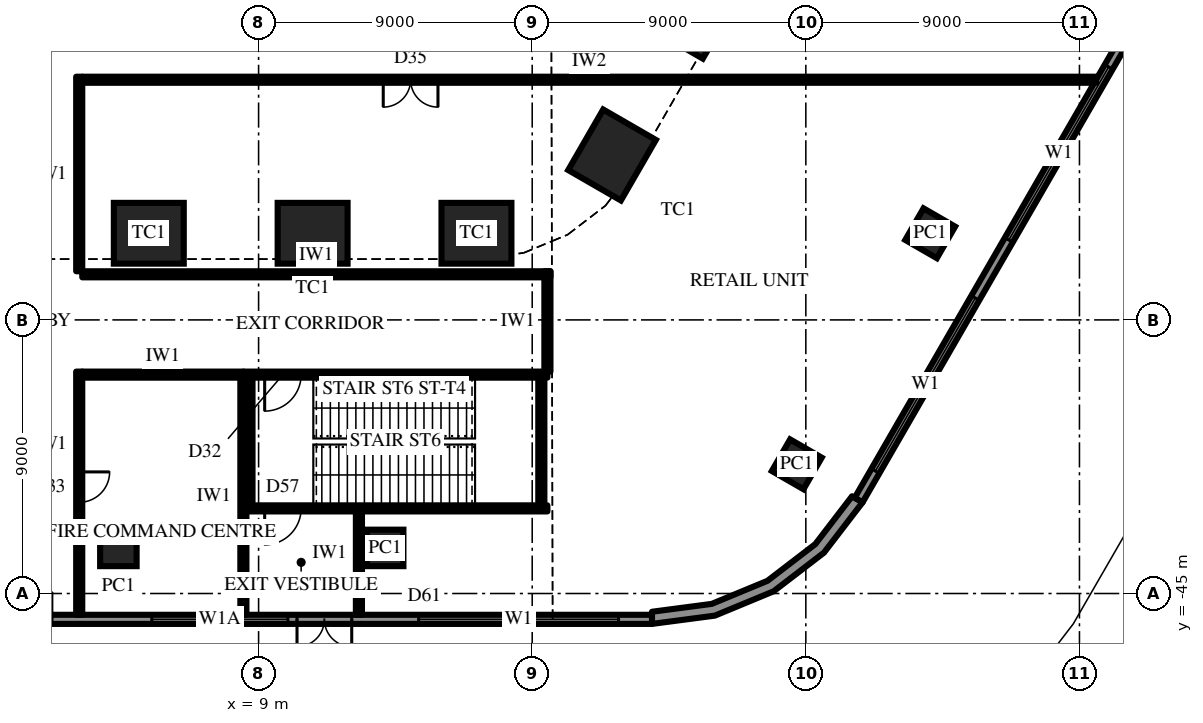
"""IFC4 building model, lengths in metres.
Left out: names, types, materials, properties, quantities, classifications, styles, units other than length and angle.
Written with IfcOpenShell. Run it as: python <this file> out.ifc"""

import sys

from ifc_helpers import new_model, si_unit, direction, frame, frame_2d, origin, origin_2d, place, context, subcontext, project, spatial, polyline, rectangle, outline, extrude, element, fill, save


model = new_model("IFC4")
c1 = context("Model", 3, precision=1e-05, world=origin(), true_north=direction((0.0, 1.0)))
c2 = subcontext(c1, "Body", "Model", "MODEL_VIEW")
j1 = project(units=[si_unit("LENGTHUNIT", "METRE"), si_unit("PLANEANGLEUNIT", "RADIAN")], contexts=[c1])
p1 = place(None, origin())
s1 = spatial("IfcSite", under=j1, at=p1, CompositionType="ELEMENT")
p2 = place(p1, origin())
s2 = spatial("IfcBuilding", under=s1, at=p2, CompositionType="ELEMENT")
p3 = place(p2, origin())
s3 = spatial("IfcBuildingStorey", under=s2, at=p3, CompositionType="ELEMENT", Elevation=0.0)
for number, where, z_axis, x_axis in (
    (1, (5.389, -33.15, 0.0), (0.0, 0.0, 1.0), (1.0, 0.0, 0.0)),
    (2, (10.777, -33.15, 0.0), (0.0, 0.0, 1.0), (1.0, 0.0, 0.0)),
    (3, (16.166, -33.15, 0.0), (0.0, 0.0, 1.0), (1.0, 0.0, 0.0)),
    (4, (20.626, -30.575, 0.0), (0.0, 0.0, 1.0), (0.5, 0.866, 0.0)),
    (5, (23.32, -25.908, 0.0), (0.0, 0.0, 1.0), (0.5, 0.866, 0.0)),
):
    element("IfcColumn", number, at=place(p3, frame(where, z_axis=z_axis, x_axis=x_axis)), inside=s3, PredefinedType="COLUMN", context=c2, shape_type="SweptSolid", body=[
        extrude(rectangle(XDim=2.3, YDim=2.0, at=origin_2d()), origin(), (0.0, 0.0, 1.0), 7.0),
    ])
p4 = place(p3, frame((8.5, -42.2, 0.0), z_axis=(0.0, 0.0, 1.0), x_axis=(1.0, 0.0, 0.0)))
e6 = element("IfcWall", 6, at=p4, inside=s3, PredefinedType="SHEAR", context=c2, shape_type="SweptSolid", body=[
    extrude(rectangle(XDim=10.0, YDim=0.2, at=frame_2d((5.0, 0.0))), origin(), (0.0, 0.0, 1.0), 7.0),
])
p5 = place(p4, frame((0.7, 0.0, 0.0)))
e7 = element("IfcOpeningElement", 7, at=p5, cuts=e6, PredefinedType="OPENING", context=c2, shape_type="SweptSolid", body=[
    extrude(rectangle(XDim=1.2, YDim=2.2, at=frame_2d((0.6, 1.1))), frame((0.0, 0.11, 0.0), z_axis=(0.0, -1.0, 0.0), x_axis=(1.0, 0.0, 0.0)), (0.0, 0.0, 1.0), 0.22),
])
p6 = place(p3, frame((18.5, -37.8, 0.0), z_axis=(0.0, 0.0, 1.0), x_axis=(-1.0, 0.0, 0.0)))
e8 = element("IfcWall", 8, at=p6, inside=s3, PredefinedType="SHEAR", context=c2, shape_type="SweptSolid", body=[
    extrude(rectangle(XDim=10.0, YDim=0.2, at=frame_2d((5.0, 0.0))), origin(), (0.0, 0.0, 1.0), 7.0),
])
p7 = place(p6, frame((8.1, 0.0, 0.0)))
e9 = element("IfcOpeningElement", 9, at=p7, cuts=e8, PredefinedType="OPENING", context=c2, shape_type="SweptSolid", body=[
    extrude(rectangle(XDim=1.2, YDim=2.2, at=frame_2d((0.6, 1.1))), frame((0.0, 0.11, 0.0), z_axis=(0.0, -1.0, 0.0), x_axis=(1.0, 0.0, 0.0)), (0.0, 0.0, 1.0), 0.22),
])
for number, where, z_axis, x_axis in (
    (10, (8.7, -37.9, 0.0), (0.0, 0.0, 1.0), (0.0, -1.0, 0.0)),
    (11, (18.3, -42.1, 0.0), (0.0, 0.0, 1.0), (0.0, 1.0, 0.0)),
):
    element("IfcWall", number, at=place(p3, frame(where, z_axis=z_axis, x_axis=x_axis)), inside=s3, PredefinedType="SHEAR", context=c2, shape_type="SweptSolid", body=[
        extrude(rectangle(XDim=4.2, YDim=0.2, at=frame_2d((2.1, 0.0))), origin(), (0.0, 0.0, 1.0), 7.0),
    ])
for number, where, z_axis, x_axis in (
    (12, (4.388, -43.5, 0.0), (0.0, 0.0, 1.0), (1.0, 0.0, 0.0)),
    (13, (13.164, -43.5, 0.0), (0.0, 0.0, 1.0), (1.0, 0.0, 0.0)),
    (14, (26.702, -40.75, 0.0), (0.0, 0.0, 1.0), (0.5, 0.866, 0.0)),
    (15, (31.09, -33.15, 0.0), (0.0, 0.0, 1.0), (0.5, 0.866, 0.0)),
):
    element("IfcColumn", number, at=place(p3, frame(where, z_axis=z_axis, x_axis=x_axis)), inside=s3, PredefinedType="COLUMN", context=c2, shape_type="SweptSolid", body=[
        extrude(rectangle(XDim=1.2, YDim=1.2, at=origin_2d()), origin(), (0.0, 0.0, 1.0), 7.0),
    ])
p8 = place(p3, origin())
e16 = element("IfcWall", 16, at=p8, inside=s3, PredefinedType="SOLIDWALL", context=c2, shape_type="SweptSolid", body=[
    extrude(outline(polyline([(21.939, -46.0), (24.01, -45.727), (25.939, -44.928), (27.596, -43.657), (28.867, -42.0), (28.521, -41.8), (27.313, -43.374), (25.739, -44.582), (23.906, -45.341), (21.939, -45.6), (21.939, -46.0)])), origin(), (0.0, 0.0, 1.0), 6.65),
])
p9 = place(p3, frame((-21.939, -45.85, 0.0), z_axis=(0.0, 0.0, 1.0), x_axis=(1.0, 0.0, 0.0)))
e17 = element("IfcWall", 17, at=p9, inside=s3, PredefinedType="SOLIDWALL", context=c2, shape_type="SweptSolid", body=[
    extrude(rectangle(XDim=43.878, YDim=0.3, at=frame_2d((21.939, 0.0))), origin(), (0.0, 0.0, 1.0), 6.65),
])
p10 = place(p9, frame((1.1, 0.0, 0.3)))
e18 = element("IfcOpeningElement", 18, at=p10, cuts=e17, PredefinedType="OPENING", context=c2, shape_type="SweptSolid", body=[
    extrude(rectangle(XDim=6.576, YDim=5.0, at=frame_2d((3.288, 2.5))), frame((0.0, 0.16, 0.0), z_axis=(0.0, -1.0, 0.0), x_axis=(1.0, 0.0, 0.0)), (0.0, 0.0, 1.0), 0.32),
])
p11 = place(p9, frame((9.875, 0.0, 0.0)))
e19 = element("IfcOpeningElement", 19, at=p11, cuts=e17, PredefinedType="OPENING", context=c2, shape_type="SweptSolid", body=[
    extrude(rectangle(XDim=1.8, YDim=2.4, at=frame_2d((0.9, 1.2))), frame((0.0, 0.16, 0.0), z_axis=(0.0, -1.0, 0.0), x_axis=(1.0, 0.0, 0.0)), (0.0, 0.0, 1.0), 0.32),
])
p12 = place(p9, frame((11.976, 0.0, 0.3)))
e20 = element("IfcOpeningElement", 20, at=p12, cuts=e17, PredefinedType="OPENING", context=c2, shape_type="SweptSolid", body=[
    extrude(rectangle(XDim=4.476, YDim=5.0, at=frame_2d((2.238, 2.5))), frame((0.0, 0.16, 0.0), z_axis=(0.0, -1.0, 0.0), x_axis=(1.0, 0.0, 0.0)), (0.0, 0.0, 1.0), 0.32),
])
p13 = place(p9, frame((19.739, 0.0, 0.0)))
e21 = element("IfcOpeningElement", 21, at=p13, cuts=e17, PredefinedType="OPENING", context=c2, shape_type="SweptSolid", body=[
    extrude(rectangle(XDim=1.8, YDim=2.7, at=frame_2d((0.9, 1.35))), frame((0.0, 0.16, 0.0), z_axis=(0.0, -1.0, 0.0), x_axis=(1.0, 0.0, 0.0)), (0.0, 0.0, 1.0), 0.32),
])
p14 = place(p9, frame((22.339, 0.0, 0.0)))
e22 = element("IfcOpeningElement", 22, at=p14, cuts=e17, PredefinedType="OPENING", context=c2, shape_type="SweptSolid", body=[
    extrude(rectangle(XDim=1.8, YDim=2.7, at=frame_2d((0.9, 1.35))), frame((0.0, 0.16, 0.0), z_axis=(0.0, -1.0, 0.0), x_axis=(1.0, 0.0, 0.0)), (0.0, 0.0, 1.0), 0.32),
])
p15 = place(p9, frame((32.203, 0.0, 0.0)))
e23 = element("IfcOpeningElement", 23, at=p15, cuts=e17, PredefinedType="OPENING", context=c2, shape_type="SweptSolid", body=[
    extrude(rectangle(XDim=1.8, YDim=2.4, at=frame_2d((0.9, 1.2))), frame((0.0, 0.16, 0.0), z_axis=(0.0, -1.0, 0.0), x_axis=(1.0, 0.0, 0.0)), (0.0, 0.0, 1.0), 0.32),
])
p16 = place(p9, frame((27.427, 0.0, 0.3)))
e24 = element("IfcOpeningElement", 24, at=p16, cuts=e17, PredefinedType="OPENING", context=c2, shape_type="SweptSolid", body=[
    extrude(rectangle(XDim=4.476, YDim=5.0, at=frame_2d((2.238, 2.5))), frame((0.0, 0.16, 0.0), z_axis=(0.0, -1.0, 0.0), x_axis=(1.0, 0.0, 0.0)), (0.0, 0.0, 1.0), 0.32),
])
p17 = place(p9, frame((36.203, 0.0, 0.3)))
e25 = element("IfcOpeningElement", 25, at=p17, cuts=e17, PredefinedType="OPENING", context=c2, shape_type="SweptSolid", body=[
    extrude(rectangle(XDim=6.576, YDim=5.0, at=frame_2d((3.288, 2.5))), frame((0.0, 0.16, 0.0), z_axis=(0.0, -1.0, 0.0), x_axis=(1.0, 0.0, 0.0)), (0.0, 0.0, 1.0), 0.32),
])
p18 = place(p3, frame((28.738, -41.925, 0.0), z_axis=(0.0, 0.0, 1.0), x_axis=(0.500002442456, 0.866023993627, 0.0)))
e26 = element("IfcWall", 26, at=p18, inside=s3, PredefinedType="SOLIDWALL", context=c2, shape_type="SweptSolid", body=[
    extrude(rectangle(XDim=43.879, YDim=0.3, at=frame_2d((21.939, 0.0))), origin(), (0.0, 0.0, 1.0), 6.65),
])
p19 = place(p18, frame((1.1, 0.0, 0.3)))
e27 = element("IfcOpeningElement", 27, at=p19, cuts=e26, PredefinedType="OPENING", context=c2, shape_type="SweptSolid", body=[
    extrude(rectangle(XDim=6.576, YDim=5.0, at=frame_2d((3.288, 2.5))), frame((0.0, 0.16, 0.0), z_axis=(0.0, -1.0, 0.0), x_axis=(1.0, 0.0, 0.0)), (0.0, 0.0, 1.0), 0.32),
])
p20 = place(p18, frame((9.875, 0.0, 0.3)))
e28 = element("IfcOpeningElement", 28, at=p20, cuts=e26, PredefinedType="OPENING", context=c2, shape_type="SweptSolid", body=[
    extrude(rectangle(XDim=6.576, YDim=5.0, at=frame_2d((3.288, 2.5))), frame((0.0, 0.16, 0.0), z_axis=(0.0, -1.0, 0.0), x_axis=(1.0, 0.0, 0.0)), (0.0, 0.0, 1.0), 0.32),
])
p21 = place(p18, frame((19.739, 0.0, 0.0)))
e29 = element("IfcOpeningElement", 29, at=p21, cuts=e26, PredefinedType="OPENING", context=c2, shape_type="SweptSolid", body=[
    extrude(rectangle(XDim=1.8, YDim=2.7, at=frame_2d((0.9, 1.35))), frame((0.0, 0.16, 0.0), z_axis=(0.0, -1.0, 0.0), x_axis=(1.0, 0.0, 0.0)), (0.0, 0.0, 1.0), 0.32),
])
p22 = place(p18, frame((22.339, 0.0, 0.0)))
e30 = element("IfcOpeningElement", 30, at=p22, cuts=e26, PredefinedType="OPENING", context=c2, shape_type="SweptSolid", body=[
    extrude(rectangle(XDim=1.8, YDim=2.7, at=frame_2d((0.9, 1.35))), frame((0.0, 0.16, 0.0), z_axis=(0.0, -1.0, 0.0), x_axis=(1.0, 0.0, 0.0)), (0.0, 0.0, 1.0), 0.32),
])
p23 = place(p18, frame((27.427, 0.0, 0.3)))
e31 = element("IfcOpeningElement", 31, at=p23, cuts=e26, PredefinedType="OPENING", context=c2, shape_type="SweptSolid", body=[
    extrude(rectangle(XDim=6.576, YDim=5.0, at=frame_2d((3.288, 2.5))), frame((0.0, 0.16, 0.0), z_axis=(0.0, -1.0, 0.0), x_axis=(1.0, 0.0, 0.0)), (0.0, 0.0, 1.0), 0.32),
])
p24 = place(p18, frame((36.203, 0.0, 0.3)))
e32 = element("IfcOpeningElement", 32, at=p24, cuts=e26, PredefinedType="OPENING", context=c2, shape_type="SweptSolid", body=[
    extrude(rectangle(XDim=6.576, YDim=5.0, at=frame_2d((3.288, 2.5))), frame((0.0, 0.16, 0.0), z_axis=(0.0, -1.0, 0.0), x_axis=(1.0, 0.0, 0.0)), (0.0, 0.0, 1.0), 0.32),
])
p25 = place(p3, frame((3.2, -28.1, 0.0), z_axis=(0.0, 0.0, 1.0), x_axis=(1.0, 0.0, 0.0)))
e33 = element("IfcWall", 33, at=p25, inside=s3, PredefinedType="PARTITIONING", context=c2, shape_type="SweptSolid", body=[
    extrude(rectangle(XDim=33.346, YDim=0.2, at=frame_2d((16.673, 0.0))), origin(), (0.0, 0.0, 1.0), 6.65),
])
p26 = place(p25, frame((9.9, 0.0, 0.0)))
e34 = element("IfcOpeningElement", 34, at=p26, cuts=e33, PredefinedType="OPENING", context=c2, shape_type="SweptSolid", body=[
    extrude(rectangle(XDim=1.8, YDim=2.4, at=frame_2d((0.9, 1.2))), frame((0.0, 0.11, 0.0), z_axis=(0.0, -1.0, 0.0), x_axis=(1.0, 0.0, 0.0)), (0.0, 0.0, 1.0), 0.22),
])
p27 = place(p3, frame((3.1, -45.7, 0.0), z_axis=(0.0, 0.0, 1.0), x_axis=(0.0, 1.0, 0.0)))
e35 = element("IfcWall", 35, at=p27, inside=s3, PredefinedType="PARTITIONING", context=c2, shape_type="SweptSolid", body=[
    extrude(rectangle(XDim=8.0, YDim=0.2, at=frame_2d((4.0, 0.0))), origin(), (0.0, 0.0, 1.0), 6.65),
])
p28 = place(p27, frame((3.7, 0.0, 0.0)))
e36 = element("IfcOpeningElement", 36, at=p28, cuts=e35, PredefinedType="OPENING", context=c2, shape_type="SweptSolid", body=[
    extrude(rectangle(XDim=1.0, YDim=2.2, at=frame_2d((0.5, 1.1))), frame((0.0, 0.11, 0.0), z_axis=(0.0, -1.0, 0.0), x_axis=(1.0, 0.0, 0.0)), (0.0, 0.0, 1.0), 0.22),
])
p29 = place(p3, frame((3.1, -34.4, 0.0), z_axis=(0.0, 0.0, 1.0), x_axis=(0.0, 1.0, 0.0)))
e37 = element("IfcWall", 37, at=p29, inside=s3, PredefinedType="PARTITIONING", context=c2, shape_type="SweptSolid", body=[
    extrude(rectangle(XDim=6.4, YDim=0.2, at=frame_2d((3.2, 0.0))), origin(), (0.0, 0.0, 1.0), 6.65),
])
p30 = place(p3, frame((3.2, -34.5, 0.0), z_axis=(0.0, 0.0, 1.0), x_axis=(1.0, 0.0, 0.0)))
e38 = element("IfcWall", 38, at=p30, inside=s3, PredefinedType="PARTITIONING", context=c2, shape_type="SweptSolid", body=[
    extrude(rectangle(XDim=15.4, YDim=0.2, at=frame_2d((7.7, 0.0))), origin(), (0.0, 0.0, 1.0), 6.65),
])
p31 = place(p3, frame((18.5, -37.7, 0.0), z_axis=(0.0, 0.0, 1.0), x_axis=(0.0, 1.0, 0.0)))
e39 = element("IfcWall", 39, at=p31, inside=s3, PredefinedType="PARTITIONING", context=c2, shape_type="SweptSolid", body=[
    extrude(rectangle(XDim=3.3, YDim=0.2, at=frame_2d((1.65, 0.0))), origin(), (0.0, 0.0, 1.0), 6.65),
])
p32 = place(p3, frame((3.2, -37.8, 0.0), z_axis=(0.0, 0.0, 1.0), x_axis=(1.0, 0.0, 0.0)))
e40 = element("IfcWall", 40, at=p32, inside=s3, PredefinedType="PARTITIONING", context=c2, shape_type="SweptSolid", body=[
    extrude(rectangle(XDim=5.3, YDim=0.2, at=frame_2d((2.65, 0.0))), origin(), (0.0, 0.0, 1.0), 6.65),
])
p33 = place(p3, frame((8.5, -45.7, 0.0), z_axis=(0.0, 0.0, 1.0), x_axis=(0.0, 1.0, 0.0)))
e41 = element("IfcWall", 41, at=p33, inside=s3, PredefinedType="PARTITIONING", context=c2, shape_type="SweptSolid", body=[
    extrude(rectangle(XDim=7.8, YDim=0.2, at=frame_2d((3.9, 0.0))), origin(), (0.0, 0.0, 1.0), 6.65),
])
p34 = place(p3, frame((12.3, -45.7, 0.0), z_axis=(0.0, 0.0, 1.0), x_axis=(0.0, 1.0, 0.0)))
e42 = element("IfcWall", 42, at=p34, inside=s3, PredefinedType="PARTITIONING", context=c2, shape_type="SweptSolid", body=[
    extrude(rectangle(XDim=3.4, YDim=0.2, at=frame_2d((1.7, 0.0))), origin(), (0.0, 0.0, 1.0), 6.65),
])
p35 = place(p15, frame((1.8, 0.0, 0.0), z_axis=(0.0, 0.0, 1.0), x_axis=(-1.0, 0.0, 0.0)))
e43 = element("IfcDoor", 43, at=p35, inside=s3, OperationType="DOUBLE_DOOR_SINGLE_SWING", PredefinedType="DOOR", context=c2, shape_type="SweptSolid", body=[
    extrude(rectangle(XDim=1.8, YDim=2.4, at=frame_2d((0.9, 1.2))), frame((0.0, 0.025, 0.0), z_axis=(0.0, -1.0, 0.0), x_axis=(1.0, 0.0, 0.0)), (0.0, 0.0, 1.0), 0.05),
])
fill(e23, e43)
p36 = place(p16, origin())
e44 = element("IfcWindow", 44, at=p36, inside=s3, PartitioningType="SINGLE_PANEL", PredefinedType="WINDOW", context=c2, shape_type="SweptSolid", body=[
    extrude(rectangle(XDim=4.476, YDim=5.0, at=frame_2d((2.238, 2.5))), frame((0.0, 0.03, 0.0), z_axis=(0.0, -1.0, 0.0), x_axis=(1.0, 0.0, 0.0)), (0.0, 0.0, 1.0), 0.06),
])
fill(e24, e44)
p37 = place(p17, origin())
e45 = element("IfcWindow", 45, at=p37, inside=s3, PartitioningType="SINGLE_PANEL", PredefinedType="WINDOW", context=c2, shape_type="SweptSolid", body=[
    extrude(rectangle(XDim=6.576, YDim=5.0, at=frame_2d((3.288, 2.5))), frame((0.0, 0.03, 0.0), z_axis=(0.0, -1.0, 0.0), x_axis=(1.0, 0.0, 0.0)), (0.0, 0.0, 1.0), 0.06),
])
fill(e25, e45)
p38 = place(p19, origin())
e46 = element("IfcWindow", 46, at=p38, inside=s3, PartitioningType="SINGLE_PANEL", PredefinedType="WINDOW", context=c2, shape_type="SweptSolid", body=[
    extrude(rectangle(XDim=6.576, YDim=5.0, at=frame_2d((3.288, 2.5))), frame((0.0, 0.03, 0.0), z_axis=(0.0, -1.0, 0.0), x_axis=(1.0, 0.0, 0.0)), (0.0, 0.0, 1.0), 0.06),
])
fill(e27, e46)
p39 = place(p20, origin())
e47 = element("IfcWindow", 47, at=p39, inside=s3, PartitioningType="SINGLE_PANEL", PredefinedType="WINDOW", context=c2, shape_type="SweptSolid", body=[
    extrude(rectangle(XDim=6.576, YDim=5.0, at=frame_2d((3.288, 2.5))), frame((0.0, 0.03, 0.0), z_axis=(0.0, -1.0, 0.0), x_axis=(1.0, 0.0, 0.0)), (0.0, 0.0, 1.0), 0.06),
])
fill(e28, e47)
p40 = place(p28, frame((1.0, 0.0, 0.0), z_axis=(0.0, 0.0, 1.0), x_axis=(-1.0, 0.0, 0.0)))
e48 = element("IfcDoor", 48, at=p40, inside=s3, OperationType="SINGLE_SWING_RIGHT", PredefinedType="DOOR", context=c2, shape_type="SweptSolid", body=[
    extrude(rectangle(XDim=1.0, YDim=2.2, at=frame_2d((0.5, 1.1))), frame((0.0, 0.025, 0.0), z_axis=(0.0, -1.0, 0.0), x_axis=(1.0, 0.0, 0.0)), (0.0, 0.0, 1.0), 0.05),
])
fill(e36, e48)
p41 = place(p26, frame((1.8, 0.0, 0.0), z_axis=(0.0, 0.0, 1.0), x_axis=(-1.0, 0.0, 0.0)))
e49 = element("IfcDoor", 49, at=p41, inside=s3, OperationType="DOUBLE_DOOR_SINGLE_SWING", PredefinedType="DOOR", context=c2, shape_type="SweptSolid", body=[
    extrude(rectangle(XDim=1.8, YDim=2.4, at=frame_2d((0.9, 1.2))), frame((0.0, 0.025, 0.0), z_axis=(0.0, -1.0, 0.0), x_axis=(1.0, 0.0, 0.0)), (0.0, 0.0, 1.0), 0.05),
])
fill(e34, e49)
p42 = place(p7, origin())
e50 = element("IfcDoor", 50, at=p42, inside=s3, OperationType="SINGLE_SWING_LEFT", PredefinedType="DOOR", context=c2, shape_type="SweptSolid", body=[
    extrude(rectangle(XDim=1.2, YDim=2.2, at=frame_2d((0.6, 1.1))), frame((0.0, 0.025, 0.0), z_axis=(0.0, -1.0, 0.0), x_axis=(1.0, 0.0, 0.0)), (0.0, 0.0, 1.0), 0.05),
])
fill(e9, e50)
p43 = place(p5, frame((1.2, 0.0, 0.0), z_axis=(0.0, 0.0, 1.0), x_axis=(-1.0, 0.0, 0.0)))
e51 = element("IfcDoor", 51, at=p43, inside=s3, OperationType="SINGLE_SWING_LEFT", PredefinedType="DOOR", context=c2, shape_type="SweptSolid", body=[
    extrude(rectangle(XDim=1.2, YDim=2.2, at=frame_2d((0.6, 1.1))), frame((0.0, 0.025, 0.0), z_axis=(0.0, -1.0, 0.0), x_axis=(1.0, 0.0, 0.0)), (0.0, 0.0, 1.0), 0.05),
])
fill(e7, e51)
save(model, sys.argv[1])
